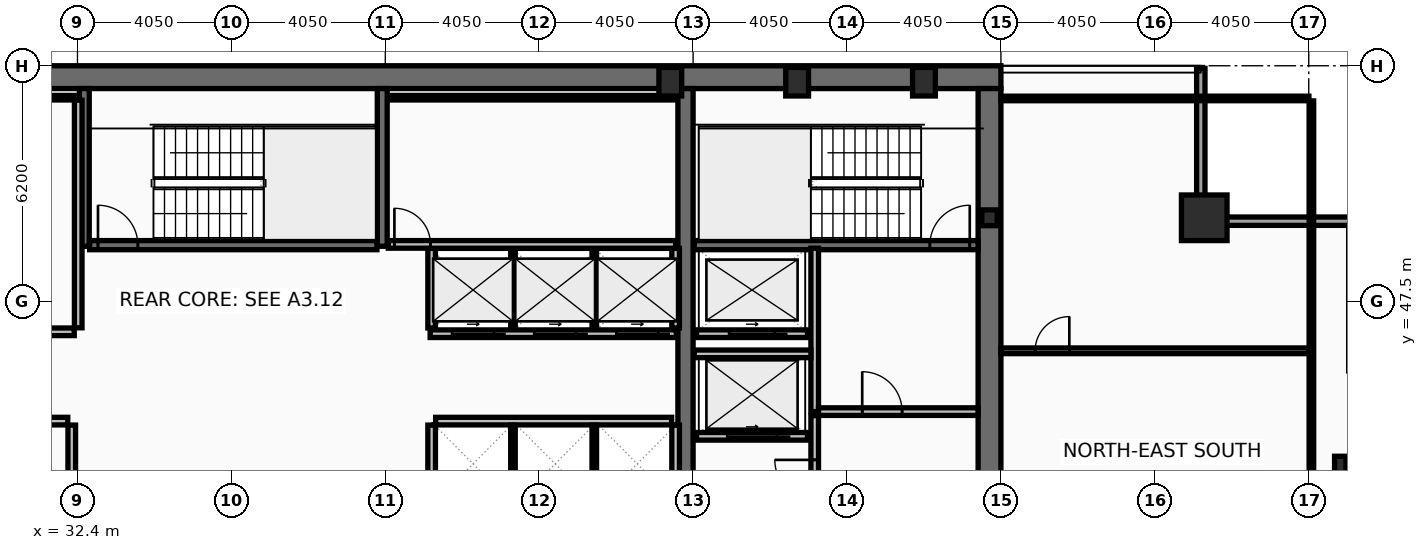
"""IFC4 building model, lengths in metres.
Left out: names, types, materials, properties, quantities, classifications, styles, units other than length and angle.
Written with IfcOpenShell. Run it as: python <this file> out.ifc"""

import sys

from ifc_helpers import new_model, si_unit, direction, frame, frame_2d, origin, origin_2d, place, context, subcontext, project, spatial, rectangle, hollow_rectangle, i_section, extrude, element, fill, save


model = new_model("IFC4")
c1 = context("Model", 3, precision=1e-05, world=origin(), true_north=direction((0.0, 1.0)))
c2 = subcontext(c1, "Body", "Model", "MODEL_VIEW")
j1 = project(units=[si_unit("LENGTHUNIT", "METRE"), si_unit("PLANEANGLEUNIT", "RADIAN")], contexts=[c1])
p1 = place(None, origin())
s1 = spatial("IfcSite", under=j1, at=p1, CompositionType="ELEMENT")
p2 = place(p1, origin())
s2 = spatial("IfcBuilding", under=s1, at=p2, CompositionType="ELEMENT")
p3 = place(p2, frame((0.0, 0.0, 213.8)))
s3 = spatial("IfcBuildingStorey", under=s2, at=p3, CompositionType="ELEMENT", Elevation=213.8)
p4 = place(p3, frame((16.2, 53.4, 0.0), z_axis=(0.0, 0.0, 1.0), x_axis=(1.0, 0.0, 0.0)))
e1 = element("IfcWall", 1, at=p4, inside=s3, PredefinedType="SHEAR", context=c2, shape_type="SweptSolid", body=[
    extrude(rectangle(XDim=40.5, YDim=0.6, at=frame_2d((20.25, 0.0))), origin(), (0.0, 0.0, 1.0), 3.44),
])
p5 = place(p3, frame((56.4, 53.1, 0.0), z_axis=(0.0, 0.0, 1.0), x_axis=(0.0, -1.0, 0.0)))
e2 = element("IfcWall", 2, at=p5, inside=s3, PredefinedType="SHEAR", context=c2, shape_type="SweptSolid", body=[
    extrude(rectangle(XDim=11.2, YDim=0.6, at=frame_2d((5.6, 0.0))), origin(), (0.0, 0.0, 1.0), 3.44),
])
p6 = place(p3, frame((48.4, 41.9, 0.0), z_axis=(0.0, 0.0, 1.0), x_axis=(0.0, 1.0, 0.0)))
e3 = element("IfcWall", 3, at=p6, inside=s3, PredefinedType="SHEAR", context=c2, shape_type="SweptSolid", body=[
    extrude(rectangle(XDim=11.2, YDim=0.4, at=frame_2d((5.6, 0.0))), origin(), (0.0, 0.0, 1.0), 3.44),
])
for number, where, z_axis, x_axis in (
    (4, (32.58, 48.95, 0.0), (0.0, 0.0, 1.0), (0.0, 1.0, 0.0)),
    (5, (40.42, 48.95, 0.0), (0.0, 0.0, 1.0), (0.0, 1.0, 0.0)),
):
    element("IfcWall", number, at=place(p3, frame(where, z_axis=z_axis, x_axis=x_axis)), inside=s3, PredefinedType="SHEAR", context=c2, shape_type="SweptSolid", body=[
        extrude(rectangle(XDim=4.15, YDim=0.26, at=frame_2d((2.075, 0.0))), origin(), (0.0, 0.0, 1.0), 3.44),
    ])
p7 = place(p3, frame((48.63, 48.98, 0.0), z_axis=(0.0, 0.0, 1.0), x_axis=(1.0, 0.0, 0.0)))
e6 = element("IfcWall", 6, at=p7, inside=s3, PredefinedType="SHEAR", context=c2, shape_type="SweptSolid", body=[
    extrude(rectangle(XDim=7.47, YDim=0.24, at=frame_2d((3.735, 0.0))), origin(), (0.0, 0.0, 1.0), 3.44),
])
p8 = place(p7, frame((6.2, 0.0, 0.0)))
e7 = element("IfcOpeningElement", 7, at=p8, cuts=e6, PredefinedType="OPENING", context=c2, shape_type="SweptSolid", body=[
    extrude(rectangle(XDim=1.05, YDim=2.15, at=frame_2d((0.525, 1.075))), frame((0.0, 0.13, 0.0), z_axis=(0.0, -1.0, 0.0), x_axis=(1.0, 0.0, 0.0)), (0.0, 0.0, 1.0), 0.26),
])
p9 = place(p3, frame((32.72, 48.98, 0.0), z_axis=(0.0, 0.0, 1.0), x_axis=(1.0, 0.0, 0.0)))
e8 = element("IfcWall", 8, at=p9, inside=s3, PredefinedType="SHEAR", context=c2, shape_type="SweptSolid", body=[
    extrude(rectangle(XDim=7.56, YDim=0.24, at=frame_2d((3.78, 0.0))), origin(), (0.0, 0.0, 1.0), 3.44),
])
p10 = place(p9, frame((0.22, 0.0, 0.0)))
e9 = element("IfcOpeningElement", 9, at=p10, cuts=e8, PredefinedType="OPENING", context=c2, shape_type="SweptSolid", body=[
    extrude(rectangle(XDim=1.05, YDim=2.15, at=frame_2d((0.525, 1.075))), frame((0.0, 0.13, 0.0), z_axis=(0.0, -1.0, 0.0), x_axis=(1.0, 0.0, 0.0)), (0.0, 0.0, 1.0), 0.26),
])
p11 = place(p3, frame((62.05, 49.7, 0.0), z_axis=(0.0, 0.0, 1.0), x_axis=(1.0, 0.0, 0.0)))
e10 = element("IfcColumn", 10, at=p11, inside=s3, PredefinedType="COLUMN", context=c2, shape_type="SweptSolid", body=[
    extrude(hollow_rectangle(XDim=1.2, YDim=1.2, WallThickness=0.06, at=origin_2d()), origin(), (0.0, 0.0, 1.0), 3.6),
])
for number, where, z_axis, x_axis in (
    (11, (48.0, 53.28, 0.0), (0.0, 0.0, 1.0), (1.0, 0.0, 0.0)),
    (12, (51.337, 53.28, 0.0), (0.0, 0.0, 1.0), (1.0, 0.0, 0.0)),
    (13, (54.675, 53.28, 0.0), (0.0, 0.0, 1.0), (1.0, 0.0, 0.0)),
):
    element("IfcColumn", number, at=place(p3, frame(where, z_axis=z_axis, x_axis=x_axis)), inside=s3, PredefinedType="COLUMN", context=c2, shape_type="SweptSolid", body=[
        extrude(hollow_rectangle(XDim=0.6, YDim=0.75, WallThickness=0.045, at=origin_2d()), origin(), (0.0, 0.0, 1.0), 3.6),
    ])
p12 = place(p3, frame((65.63, 43.2, 0.0), z_axis=(0.0, 0.0, 1.0), x_axis=(1.0, 0.0, 0.0)))
e14 = element("IfcColumn", 14, at=p12, inside=s3, PredefinedType="COLUMN", context=c2, shape_type="SweptSolid", body=[
    extrude(i_section(OverallWidth=0.3, OverallDepth=0.45, WebThickness=0.014, FlangeThickness=0.026, at=origin_2d()), origin(), (0.0, 0.0, 1.0), 3.6),
])
p13 = place(p3, frame((56.4, 49.7, 0.0), z_axis=(0.0, 0.0, 1.0), x_axis=(1.0, 0.0, 0.0)))
e15 = element("IfcColumn", 15, at=p13, inside=s3, PredefinedType="COLUMN", context=c2, shape_type="SweptSolid", body=[
    extrude(i_section(OverallWidth=0.406, OverallDepth=0.416, WebThickness=0.03, FlangeThickness=0.048, at=origin_2d()), origin(), (0.0, 0.0, 1.0), 3.6),
])
p14 = place(p3, frame((61.96, 53.63, 0.0), z_axis=(0.0, 0.0, 1.0), x_axis=(0.0, -1.0, 0.0)))
e16 = element("IfcWall", 16, at=p14, inside=s3, PredefinedType="SOLIDWALL", context=c2, shape_type="SweptSolid", body=[
    extrude(rectangle(XDim=3.91, YDim=0.22, at=frame_2d((1.955, 0.0))), origin(), (0.0, 0.0, 1.0), 2.83),
])
p15 = place(p3, frame((61.85, 49.61, 0.0), z_axis=(0.0, 0.0, 1.0), x_axis=(1.0, 0.0, 0.0)))
e17 = element("IfcWall", 17, at=p15, inside=s3, PredefinedType="SOLIDWALL", context=c2, shape_type="SweptSolid", body=[
    extrude(rectangle(XDim=4.22, YDim=0.22, at=frame_2d((2.11, 0.0))), origin(), (0.0, 0.0, 1.0), 2.83),
])
p16 = place(p3, frame((51.61, 43.95, 0.0), z_axis=(0.0, 0.0, 1.0), x_axis=(-1.0, 0.0, 0.0)))
e18 = element("IfcWall", 18, at=p16, inside=s3, PredefinedType="PARTITIONING", context=c2, shape_type="SweptSolid", body=[
    extrude(rectangle(XDim=2.92, YDim=0.2, at=frame_2d((1.46, 0.0))), origin(), (0.0, 0.0, 1.0), 3.44),
])
p17 = place(p16, frame((0.81, 0.0, 0.0)))
e19 = element("IfcOpeningElement", 19, at=p17, cuts=e18, PredefinedType="OPENING", context=c2, shape_type="SweptSolid", body=[
    extrude(rectangle(XDim=1.3, YDim=2.18, at=frame_2d((0.65, 1.09))), frame((0.0, 0.11, 0.0), z_axis=(0.0, -1.0, 0.0), x_axis=(1.0, 0.0, 0.0)), (0.0, 0.0, 1.0), 0.22),
])
p18 = place(p3, frame((51.61, 46.65, 0.0), z_axis=(0.0, 0.0, 1.0), x_axis=(-1.0, 0.0, 0.0)))
e20 = element("IfcWall", 20, at=p18, inside=s3, PredefinedType="PARTITIONING", context=c2, shape_type="SweptSolid", body=[
    extrude(rectangle(XDim=2.92, YDim=0.2, at=frame_2d((1.46, 0.0))), origin(), (0.0, 0.0, 1.0), 3.44),
])
p19 = place(p18, frame((0.86, 0.0, 0.0)))
e21 = element("IfcOpeningElement", 21, at=p19, cuts=e20, PredefinedType="OPENING", context=c2, shape_type="SweptSolid", body=[
    extrude(rectangle(XDim=1.2, YDim=2.18, at=frame_2d((0.6, 1.09))), frame((0.0, 0.11, 0.0), z_axis=(0.0, -1.0, 0.0), x_axis=(1.0, 0.0, 0.0)), (0.0, 0.0, 1.0), 0.22),
])
p20 = place(p3, frame((48.16, 46.65, 0.0), z_axis=(0.0, 0.0, 1.0), x_axis=(-1.0, 0.0, 0.0)))
e22 = element("IfcWall", 22, at=p20, inside=s3, PredefinedType="PARTITIONING", context=c2, shape_type="SweptSolid", body=[
    extrude(rectangle(XDim=6.48, YDim=0.2, at=frame_2d((3.24, 0.0))), origin(), (0.0, 0.0, 1.0), 3.44),
])
p21 = place(p20, frame((4.8, 0.0, 0.0)))
e23 = element("IfcOpeningElement", 23, at=p21, cuts=e22, PredefinedType="OPENING", context=c2, shape_type="SweptSolid", body=[
    extrude(rectangle(XDim=1.1, YDim=2.18, at=frame_2d((0.55, 1.09))), frame((0.0, 0.11, 0.0), z_axis=(0.0, -1.0, 0.0), x_axis=(1.0, 0.0, 0.0)), (0.0, 0.0, 1.0), 0.22),
])
p22 = place(p20, frame((2.64, 0.0, 0.0)))
e24 = element("IfcOpeningElement", 24, at=p22, cuts=e22, PredefinedType="OPENING", context=c2, shape_type="SweptSolid", body=[
    extrude(rectangle(XDim=1.1, YDim=2.18, at=frame_2d((0.55, 1.09))), frame((0.0, 0.11, 0.0), z_axis=(0.0, -1.0, 0.0), x_axis=(1.0, 0.0, 0.0)), (0.0, 0.0, 1.0), 0.22),
])
p23 = place(p20, frame((0.48, 0.0, 0.0)))
e25 = element("IfcOpeningElement", 25, at=p23, cuts=e22, PredefinedType="OPENING", context=c2, shape_type="SweptSolid", body=[
    extrude(rectangle(XDim=1.1, YDim=2.18, at=frame_2d((0.55, 1.09))), frame((0.0, 0.11, 0.0), z_axis=(0.0, -1.0, 0.0), x_axis=(1.0, 0.0, 0.0)), (0.0, 0.0, 1.0), 0.22),
])
p24 = place(p3, frame((51.8, 44.6, 0.0), z_axis=(0.0, 0.0, 1.0), x_axis=(0.0, 1.0, 0.0)))
e26 = element("IfcWall", 26, at=p24, inside=s3, PredefinedType="PARTITIONING", context=c2, shape_type="SweptSolid", body=[
    extrude(rectangle(XDim=4.3, YDim=0.2, at=frame_2d((2.15, 0.0))), origin(), (0.0, 0.0, 1.0), 3.44),
])
p25 = place(p3, frame((51.9, 44.6, 0.0), z_axis=(0.0, 0.0, 1.0), x_axis=(1.0, 0.0, 0.0)))
e27 = element("IfcWall", 27, at=p25, inside=s3, PredefinedType="PARTITIONING", context=c2, shape_type="SweptSolid", body=[
    extrude(rectangle(XDim=4.2, YDim=0.2, at=frame_2d((2.1, 0.0))), origin(), (0.0, 0.0, 1.0), 3.44),
])
p26 = place(p25, frame((1.15, 0.0, 0.0)))
e28 = element("IfcOpeningElement", 28, at=p26, cuts=e27, PredefinedType="OPENING", context=c2, shape_type="SweptSolid", body=[
    extrude(rectangle(XDim=1.05, YDim=2.15, at=frame_2d((0.525, 1.075))), frame((0.0, 0.11, 0.0), z_axis=(0.0, -1.0, 0.0), x_axis=(1.0, 0.0, 0.0)), (0.0, 0.0, 1.0), 0.22),
])
p27 = place(p3, frame((48.63, 46.12, 0.0), z_axis=(0.0, 0.0, 1.0), x_axis=(1.0, 0.0, 0.0)))
e29 = element("IfcWall", 29, at=p27, inside=s3, PredefinedType="PARTITIONING", context=c2, shape_type="SweptSolid", body=[
    extrude(rectangle(XDim=3.07, YDim=0.2, at=frame_2d((1.535, 0.0))), origin(), (0.0, 0.0, 1.0), 3.44),
])
p28 = place(p3, frame((51.8, 41.9, 0.0), z_axis=(0.0, 0.0, 1.0), x_axis=(0.0, 1.0, 0.0)))
e30 = element("IfcWall", 30, at=p28, inside=s3, PredefinedType="PARTITIONING", context=c2, shape_type="SweptSolid", body=[
    extrude(rectangle(XDim=2.595, YDim=0.2, at=frame_2d((1.298, 0.0))), origin(), (0.0, 0.0, 1.0), 3.44),
])
p29 = place(p28, frame((0.38, 0.0, 0.0)))
e31 = element("IfcOpeningElement", 31, at=p29, cuts=e30, PredefinedType="OPENING", context=c2, shape_type="SweptSolid", body=[
    extrude(rectangle(XDim=1.05, YDim=2.15, at=frame_2d((0.525, 1.075))), frame((0.0, 0.11, 0.0), z_axis=(0.0, -1.0, 0.0), x_axis=(1.0, 0.0, 0.0)), (0.0, 0.0, 1.0), 0.22),
])
p30 = place(p3, frame((32.42, 46.805, 0.0), z_axis=(0.0, 0.0, 1.0), x_axis=(0.0, 1.0, 0.0)))
e32 = element("IfcWall", 32, at=p30, inside=s3, PredefinedType="PARTITIONING", context=c2, shape_type="SweptSolid", body=[
    extrude(rectangle(XDim=5.99, YDim=0.2, at=frame_2d((2.995, 0.0))), origin(), (0.0, 0.0, 1.0), 3.44),
])
p31 = place(p3, frame((24.805, 52.86, 0.0), z_axis=(0.0, 0.0, 1.0), x_axis=(1.0, 0.0, 0.0)))
e33 = element("IfcWall", 33, at=p31, inside=s3, PredefinedType="PARTITIONING", context=c2, shape_type="SweptSolid", body=[
    extrude(rectangle(XDim=7.51, YDim=0.12, at=frame_2d((3.755, 0.0))), origin(), (0.0, 0.0, 1.0), 3.44),
])
p32 = place(p3, frame((24.805, 46.7, 0.0), z_axis=(0.0, 0.0, 1.0), x_axis=(1.0, 0.0, 0.0)))
e34 = element("IfcWall", 34, at=p32, inside=s3, PredefinedType="PARTITIONING", context=c2, shape_type="SweptSolid", body=[
    extrude(rectangle(XDim=7.51, YDim=0.2, at=frame_2d((3.755, 0.0))), origin(), (0.0, 0.0, 1.0), 3.44),
])
p33 = place(p32, frame((2.4, 0.0, 0.0)))
e35 = element("IfcOpeningElement", 35, at=p33, cuts=e34, PredefinedType="OPENING", context=c2, shape_type="SweptSolid", body=[
    extrude(rectangle(XDim=0.95, YDim=2.1, at=frame_2d((0.475, 1.05))), frame((0.0, 0.11, 0.0), z_axis=(0.0, -1.0, 0.0), x_axis=(1.0, 0.0, 0.0)), (0.0, 0.0, 1.0), 0.22),
])
p34 = place(p3, frame((32.25, 41.95, 0.0), z_axis=(0.0, 0.0, 1.0), x_axis=(0.0, 1.0, 0.0)))
e36 = element("IfcWall", 36, at=p34, inside=s3, PredefinedType="PARTITIONING", context=c2, shape_type="SweptSolid", body=[
    extrude(rectangle(XDim=2.295, YDim=0.2, at=frame_2d((1.147, 0.0))), origin(), (0.0, 0.0, 1.0), 3.44),
])
p35 = place(p3, frame((24.805, 44.35, 0.0), z_axis=(0.0, 0.0, 1.0), x_axis=(1.0, 0.0, 0.0)))
e37 = element("IfcWall", 37, at=p35, inside=s3, PredefinedType="PARTITIONING", context=c2, shape_type="SweptSolid", body=[
    extrude(rectangle(XDim=7.34, YDim=0.2, at=frame_2d((3.67, 0.0))), origin(), (0.0, 0.0, 1.0), 3.44),
])
p36 = place(p35, frame((2.4, 0.0, 0.0)))
e38 = element("IfcOpeningElement", 38, at=p36, cuts=e37, PredefinedType="OPENING", context=c2, shape_type="SweptSolid", body=[
    extrude(rectangle(XDim=0.95, YDim=2.1, at=frame_2d((0.475, 1.05))), frame((0.0, 0.11, 0.0), z_axis=(0.0, -1.0, 0.0), x_axis=(1.0, 0.0, 0.0)), (0.0, 0.0, 1.0), 0.22),
])
for number, where, z_axis, x_axis in (
    (39, (41.72, 46.8, 0.0), (0.0, 0.0, 1.0), (0.0, 1.0, 0.0)),
    (40, (48.14, 46.8, 0.0), (0.0, 0.0, 1.0), (0.0, 1.0, 0.0)),
):
    element("IfcWall", number, at=place(p3, frame(where, z_axis=z_axis, x_axis=x_axis)), inside=s3, PredefinedType="PARTITIONING", context=c2, shape_type="SweptSolid", body=[
        extrude(rectangle(XDim=2.095, YDim=0.2, at=frame_2d((1.047, 0.0))), origin(), (0.0, 0.0, 1.0), 3.44),
    ])
for number, where, z_axis, x_axis in (
    (41, (43.86, 46.8, 0.0), (0.0, 0.0, 1.0), (0.0, 1.0, 0.0)),
    (42, (46.0, 46.8, 0.0), (0.0, 0.0, 1.0), (0.0, 1.0, 0.0)),
):
    element("IfcWall", number, at=place(p3, frame(where, z_axis=z_axis, x_axis=x_axis)), inside=s3, PredefinedType="PARTITIONING", context=c2, shape_type="SweptSolid", body=[
        extrude(rectangle(XDim=2.095, YDim=0.12, at=frame_2d((1.047, 0.0))), origin(), (0.0, 0.0, 1.0), 3.44),
    ])
p37 = place(p3, frame((41.825, 44.35, 0.0), z_axis=(0.0, 0.0, 1.0), x_axis=(1.0, 0.0, 0.0)))
e43 = element("IfcWall", 43, at=p37, inside=s3, PredefinedType="PARTITIONING", context=c2, shape_type="SweptSolid", body=[
    extrude(rectangle(XDim=6.21, YDim=0.2, at=frame_2d((3.105, 0.0))), origin(), (0.0, 0.0, 1.0), 3.44),
])
for number, where, z_axis, x_axis in (
    (44, (41.72, 41.95, 0.0), (0.0, 0.0, 1.0), (0.0, 1.0, 0.0)),
    (45, (48.14, 41.95, 0.0), (0.0, 0.0, 1.0), (0.0, 1.0, 0.0)),
):
    element("IfcWall", number, at=place(p3, frame(where, z_axis=z_axis, x_axis=x_axis)), inside=s3, PredefinedType="PARTITIONING", context=c2, shape_type="SweptSolid", body=[
        extrude(rectangle(XDim=2.295, YDim=0.2, at=frame_2d((1.147, 0.0))), origin(), (0.0, 0.0, 1.0), 3.44),
    ])
for number, where, z_axis, x_axis in (
    (46, (43.86, 41.95, 0.0), (0.0, 0.0, 1.0), (0.0, 1.0, 0.0)),
    (47, (46.0, 41.95, 0.0), (0.0, 0.0, 1.0), (0.0, 1.0, 0.0)),
):
    element("IfcWall", number, at=place(p3, frame(where, z_axis=z_axis, x_axis=x_axis)), inside=s3, PredefinedType="PARTITIONING", context=c2, shape_type="SweptSolid", body=[
        extrude(rectangle(XDim=2.295, YDim=0.12, at=frame_2d((1.147, 0.0))), origin(), (0.0, 0.0, 1.0), 3.44),
    ])
p38 = place(p3, frame((40.58, 52.86, 0.0), z_axis=(0.0, 0.0, 1.0), x_axis=(1.0, 0.0, 0.0)))
e48 = element("IfcWall", 48, at=p38, inside=s3, PredefinedType="PARTITIONING", context=c2, shape_type="SweptSolid", body=[
    extrude(rectangle(XDim=7.56, YDim=0.12, at=frame_2d((3.78, 0.0))), origin(), (0.0, 0.0, 1.0), 3.44),
])
p39 = place(p3, frame((40.58, 49.0, 0.0), z_axis=(0.0, 0.0, 1.0), x_axis=(1.0, 0.0, 0.0)))
e49 = element("IfcWall", 49, at=p39, inside=s3, PredefinedType="PARTITIONING", context=c2, shape_type="SweptSolid", body=[
    extrude(rectangle(XDim=7.56, YDim=0.2, at=frame_2d((3.78, 0.0))), origin(), (0.0, 0.0, 1.0), 3.44),
])
p40 = place(p39, frame((0.16, 0.0, 0.0)))
e50 = element("IfcOpeningElement", 50, at=p40, cuts=e49, PredefinedType="OPENING", context=c2, shape_type="SweptSolid", body=[
    extrude(rectangle(XDim=0.95, YDim=2.1, at=frame_2d((0.475, 1.05))), frame((0.0, 0.11, 0.0), z_axis=(0.0, -1.0, 0.0), x_axis=(1.0, 0.0, 0.0)), (0.0, 0.0, 1.0), 0.22),
])
p41 = place(p3, frame((56.7, 46.2, 0.0), z_axis=(0.0, 0.0, 1.0), x_axis=(1.0, 0.0, 0.0)))
e51 = element("IfcWall", 51, at=p41, inside=s3, PredefinedType="PARTITIONING", context=c2, shape_type="SweptSolid", body=[
    extrude(rectangle(XDim=8.105, YDim=0.15, at=frame_2d((4.052, 0.0))), origin(), (0.0, 0.0, 1.0), 2.83),
])
p42 = place(p41, frame((0.9, 0.0, 0.0)))
e52 = element("IfcOpeningElement", 52, at=p42, cuts=e51, PredefinedType="OPENING", context=c2, shape_type="SweptSolid", body=[
    extrude(rectangle(XDim=0.9, YDim=2.05, at=frame_2d((0.45, 1.025))), frame((0.0, 0.085, 0.0), z_axis=(0.0, -1.0, 0.0), x_axis=(1.0, 0.0, 0.0)), (0.0, 0.0, 1.0), 0.17),
])
p43 = place(p3, frame((64.87, 10.665, 0.0), z_axis=(0.0, 0.0, 1.0), x_axis=(0.0, 1.0, 0.0)))
e53 = element("IfcWall", 53, at=p43, inside=s3, PredefinedType="PARTITIONING", context=c2, shape_type="SweptSolid", body=[
    extrude(rectangle(XDim=42.11, YDim=0.12, at=frame_2d((21.055, 0.0))), origin(), (0.0, 0.0, 1.0), 2.73),
])
p44 = place(p3, frame((56.7, 52.84, 0.0), z_axis=(0.0, 0.0, 1.0), x_axis=(1.0, 0.0, 0.0)))
e54 = element("IfcWall", 54, at=p44, inside=s3, PredefinedType="PARTITIONING", context=c2, shape_type="SweptSolid", body=[
    extrude(rectangle(XDim=8.105, YDim=0.12, at=frame_2d((4.052, 0.0))), origin(), (0.0, 0.0, 1.0), 3.44),
])
p45 = place(p8, origin())
e55 = element("IfcDoor", 55, at=p45, inside=s3, OperationType="SINGLE_SWING_RIGHT", PredefinedType="DOOR", context=c2, shape_type="SweptSolid", body=[
    extrude(rectangle(XDim=1.05, YDim=2.15, at=frame_2d((0.525, 1.075))), frame((0.0, 0.025, 0.0), z_axis=(0.0, -1.0, 0.0), x_axis=(1.0, 0.0, 0.0)), (0.0, 0.0, 1.0), 0.05),
])
fill(e7, e55)
p46 = place(p10, origin())
e56 = element("IfcDoor", 56, at=p46, inside=s3, OperationType="SINGLE_SWING_LEFT", PredefinedType="DOOR", context=c2, shape_type="SweptSolid", body=[
    extrude(rectangle(XDim=1.05, YDim=2.15, at=frame_2d((0.525, 1.075))), frame((0.0, 0.025, 0.0), z_axis=(0.0, -1.0, 0.0), x_axis=(1.0, 0.0, 0.0)), (0.0, 0.0, 1.0), 0.05),
])
fill(e9, e56)
p47 = place(p17, origin())
e57 = element("IfcDoor", 57, at=p47, inside=s3, OperationType="SLIDING_TO_LEFT", PredefinedType="DOOR", context=c2, shape_type="SweptSolid", body=[
    extrude(rectangle(XDim=1.3, YDim=2.18, at=frame_2d((0.65, 1.09))), frame((0.0, 0.025, 0.0), z_axis=(0.0, -1.0, 0.0), x_axis=(1.0, 0.0, 0.0)), (0.0, 0.0, 1.0), 0.05),
])
fill(e19, e57)
p48 = place(p19, origin())
e58 = element("IfcDoor", 58, at=p48, inside=s3, OperationType="SLIDING_TO_LEFT", PredefinedType="DOOR", context=c2, shape_type="SweptSolid", body=[
    extrude(rectangle(XDim=1.2, YDim=2.18, at=frame_2d((0.6, 1.09))), frame((0.0, 0.025, 0.0), z_axis=(0.0, -1.0, 0.0), x_axis=(1.0, 0.0, 0.0)), (0.0, 0.0, 1.0), 0.05),
])
fill(e21, e58)
p49 = place(p21, origin())
e59 = element("IfcDoor", 59, at=p49, inside=s3, OperationType="SLIDING_TO_LEFT", PredefinedType="DOOR", context=c2, shape_type="SweptSolid", body=[
    extrude(rectangle(XDim=1.1, YDim=2.18, at=frame_2d((0.55, 1.09))), frame((0.0, 0.025, 0.0), z_axis=(0.0, -1.0, 0.0), x_axis=(1.0, 0.0, 0.0)), (0.0, 0.0, 1.0), 0.05),
])
fill(e23, e59)
p50 = place(p22, origin())
e60 = element("IfcDoor", 60, at=p50, inside=s3, OperationType="SLIDING_TO_LEFT", PredefinedType="DOOR", context=c2, shape_type="SweptSolid", body=[
    extrude(rectangle(XDim=1.1, YDim=2.18, at=frame_2d((0.55, 1.09))), frame((0.0, 0.025, 0.0), z_axis=(0.0, -1.0, 0.0), x_axis=(1.0, 0.0, 0.0)), (0.0, 0.0, 1.0), 0.05),
])
fill(e24, e60)
p51 = place(p23, origin())
e61 = element("IfcDoor", 61, at=p51, inside=s3, OperationType="SLIDING_TO_LEFT", PredefinedType="DOOR", context=c2, shape_type="SweptSolid", body=[
    extrude(rectangle(XDim=1.1, YDim=2.18, at=frame_2d((0.55, 1.09))), frame((0.0, 0.025, 0.0), z_axis=(0.0, -1.0, 0.0), x_axis=(1.0, 0.0, 0.0)), (0.0, 0.0, 1.0), 0.05),
])
fill(e25, e61)
p52 = place(p26, origin())
e62 = element("IfcDoor", 62, at=p52, inside=s3, OperationType="SINGLE_SWING_LEFT", PredefinedType="DOOR", context=c2, shape_type="SweptSolid", body=[
    extrude(rectangle(XDim=1.05, YDim=2.15, at=frame_2d((0.525, 1.075))), frame((0.0, 0.025, 0.0), z_axis=(0.0, -1.0, 0.0), x_axis=(1.0, 0.0, 0.0)), (0.0, 0.0, 1.0), 0.05),
])
fill(e28, e62)
p53 = place(p29, origin())
e63 = element("IfcDoor", 63, at=p53, inside=s3, OperationType="SINGLE_SWING_RIGHT", PredefinedType="DOOR", context=c2, shape_type="SweptSolid", body=[
    extrude(rectangle(XDim=1.05, YDim=2.15, at=frame_2d((0.525, 1.075))), frame((0.0, 0.025, 0.0), z_axis=(0.0, -1.0, 0.0), x_axis=(1.0, 0.0, 0.0)), (0.0, 0.0, 1.0), 0.05),
])
fill(e31, e63)
p54 = place(p40, origin())
e64 = element("IfcDoor", 64, at=p54, inside=s3, OperationType="SINGLE_SWING_LEFT", PredefinedType="DOOR", context=c2, shape_type="SweptSolid", body=[
    extrude(rectangle(XDim=0.95, YDim=2.1, at=frame_2d((0.475, 1.05))), frame((0.0, 0.025, 0.0), z_axis=(0.0, -1.0, 0.0), x_axis=(1.0, 0.0, 0.0)), (0.0, 0.0, 1.0), 0.05),
])
fill(e50, e64)
p55 = place(p42, origin())
e65 = element("IfcDoor", 65, at=p55, inside=s3, OperationType="SINGLE_SWING_RIGHT", PredefinedType="DOOR", context=c2, shape_type="SweptSolid", body=[
    extrude(rectangle(XDim=0.9, YDim=2.05, at=frame_2d((0.45, 1.025))), frame((0.0, 0.025, 0.0), z_axis=(0.0, -1.0, 0.0), x_axis=(1.0, 0.0, 0.0)), (0.0, 0.0, 1.0), 0.05),
])
fill(e52, e65)
save(model, sys.argv[1])
